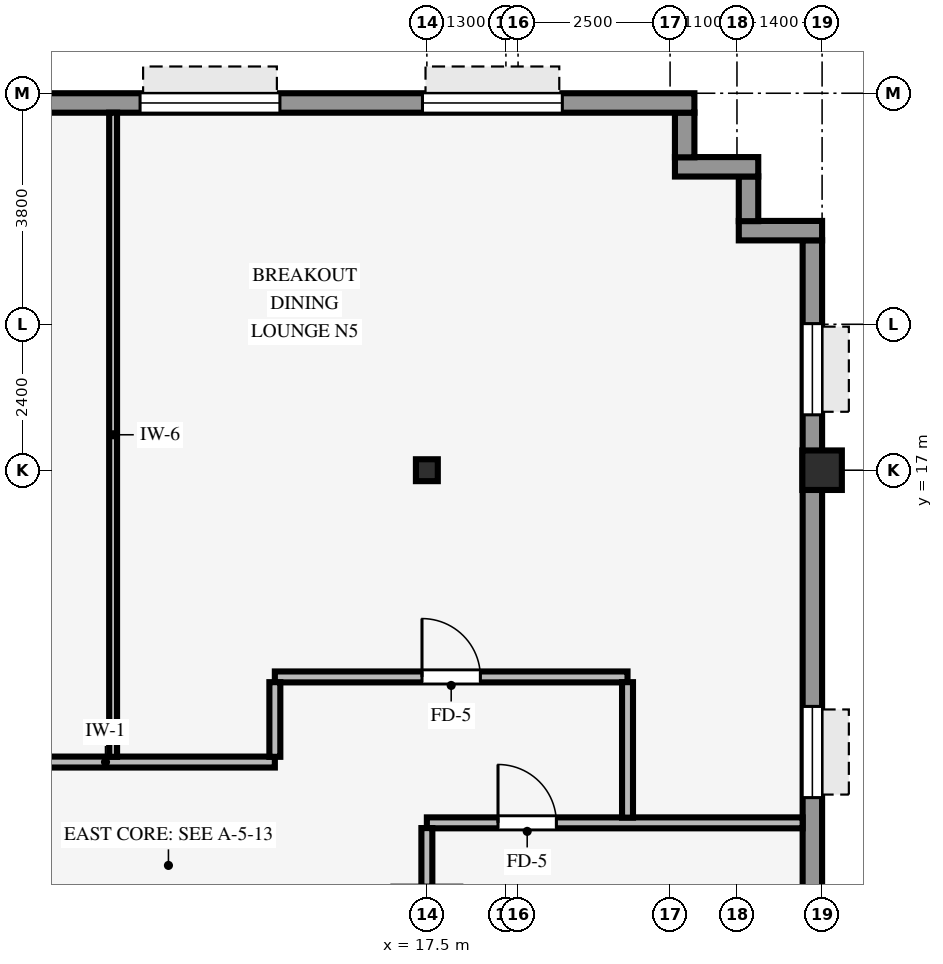
"""IFC4 building model, lengths in metres.
Left out: names, types, materials, properties, quantities, classifications, styles, units other than length and angle.
Written with IfcOpenShell. Run it as: python <this file> out.ifc"""

import sys

from ifc_helpers import new_model, si_unit, direction, frame, frame_2d, origin, origin_2d, place, context, subcontext, project, spatial, rectangle, hollow_rectangle, i_section, extrude, source, transform, mapped, element, fill, save


model = new_model("IFC4")
c1 = context("Model", 3, precision=1e-05, world=origin(), true_north=direction((0.0, 1.0)))
c2 = subcontext(c1, "Body", "Model", "MODEL_VIEW")
j1 = project(units=[si_unit("LENGTHUNIT", "METRE"), si_unit("PLANEANGLEUNIT", "RADIAN")], contexts=[c1])
p1 = place(None, origin())
s1 = spatial("IfcSite", under=j1, at=p1, CompositionType="ELEMENT")
p2 = place(p1, origin())
s2 = spatial("IfcBuilding", under=s1, at=p2, CompositionType="ELEMENT")
p3 = place(p2, frame((0.0, 0.0, 105.6)))
s3 = spatial("IfcBuildingStorey", under=s2, at=p3, CompositionType="ELEMENT", Elevation=105.6)
p4 = place(p3, frame((24.0, 17.0, 0.0), z_axis=(0.0, 0.0, 1.0), x_axis=(1.0, 0.0, 0.0)))
e1 = element("IfcColumn", 1, at=p4, inside=s3, PredefinedType="COLUMN", context=c2, shape_type="SweptSolid", body=[
    extrude(hollow_rectangle(XDim=0.65, YDim=0.65, WallThickness=0.04, InnerFilletRadius=0.04, OuterFilletRadius=0.08, at=origin_2d()), origin(), (0.0, 0.0, 1.0), 3.37),
])
p5 = place(p3, frame((17.5, 17.0, 0.0), z_axis=(0.0, 0.0, 1.0), x_axis=(1.0, 0.0, 0.0)))
e2 = element("IfcColumn", 2, at=p5, inside=s3, PredefinedType="COLUMN", context=c2, shape_type="SweptSolid", body=[
    extrude(i_section(OverallWidth=0.36, OverallDepth=0.36, WebThickness=0.021, FlangeThickness=0.021, FilletRadius=0.018, at=origin_2d()), origin(), (0.0, 0.0, 1.0), 3.37),
])
p6 = place(p3, frame((23.84, -20.784, 0.0), z_axis=(0.0, 0.0, 1.0), x_axis=(0.0, 1.0, 0.0)))
e3 = element("IfcWall", 3, at=p6, inside=s3, PredefinedType="STANDARD", context=c2, shape_type="SweptSolid", body=[
    extrude(rectangle(XDim=41.568, YDim=0.32, at=frame_2d((20.784, 0.0))), origin(), (0.0, 0.0, 1.0), 2.705),
])
p7 = place(p6, frame((1.373, 0.0, 0.8)))
e4 = element("IfcOpeningElement", 4, at=p7, cuts=e3, PredefinedType="OPENING", context=c2, shape_type="SweptSolid", body=[
    extrude(rectangle(XDim=1.5, YDim=1.6, at=frame_2d((0.75, 0.8))), frame((0.0, 0.17, 0.0), z_axis=(0.0, -1.0, 0.0), x_axis=(1.0, 0.0, 0.0)), (0.0, 0.0, 1.0), 0.34),
])
p8 = place(p6, frame((7.669, 0.0, 0.8)))
e5 = element("IfcOpeningElement", 5, at=p8, cuts=e3, PredefinedType="OPENING", context=c2, shape_type="SweptSolid", body=[
    extrude(rectangle(XDim=1.5, YDim=1.6, at=frame_2d((0.75, 0.8))), frame((0.0, 0.17, 0.0), z_axis=(0.0, -1.0, 0.0), x_axis=(1.0, 0.0, 0.0)), (0.0, 0.0, 1.0), 0.34),
])
p9 = place(p6, frame((12.615, 0.0, 0.8)))
e6 = element("IfcOpeningElement", 6, at=p9, cuts=e3, PredefinedType="OPENING", context=c2, shape_type="SweptSolid", body=[
    extrude(rectangle(XDim=1.5, YDim=1.6, at=frame_2d((0.75, 0.8))), frame((0.0, 0.17, 0.0), z_axis=(0.0, -1.0, 0.0), x_axis=(1.0, 0.0, 0.0)), (0.0, 0.0, 1.0), 0.34),
])
p10 = place(p6, frame((17.561, 0.0, 0.8)))
e7 = element("IfcOpeningElement", 7, at=p10, cuts=e3, PredefinedType="OPENING", context=c2, shape_type="SweptSolid", body=[
    extrude(rectangle(XDim=1.5, YDim=1.6, at=frame_2d((0.75, 0.8))), frame((0.0, 0.17, 0.0), z_axis=(0.0, -1.0, 0.0), x_axis=(1.0, 0.0, 0.0)), (0.0, 0.0, 1.0), 0.34),
])
p11 = place(p6, frame((22.507, 0.0, 0.8)))
e8 = element("IfcOpeningElement", 8, at=p11, cuts=e3, PredefinedType="OPENING", context=c2, shape_type="SweptSolid", body=[
    extrude(rectangle(XDim=1.5, YDim=1.6, at=frame_2d((0.75, 0.8))), frame((0.0, 0.17, 0.0), z_axis=(0.0, -1.0, 0.0), x_axis=(1.0, 0.0, 0.0)), (0.0, 0.0, 1.0), 0.34),
])
p12 = place(p6, frame((27.453, 0.0, 0.8)))
e9 = element("IfcOpeningElement", 9, at=p12, cuts=e3, PredefinedType="OPENING", context=c2, shape_type="SweptSolid", body=[
    extrude(rectangle(XDim=1.5, YDim=1.6, at=frame_2d((0.75, 0.8))), frame((0.0, 0.17, 0.0), z_axis=(0.0, -1.0, 0.0), x_axis=(1.0, 0.0, 0.0)), (0.0, 0.0, 1.0), 0.34),
])
p13 = place(p6, frame((32.399, 0.0, 0.8)))
e10 = element("IfcOpeningElement", 10, at=p13, cuts=e3, PredefinedType="OPENING", context=c2, shape_type="SweptSolid", body=[
    extrude(rectangle(XDim=1.5, YDim=1.6, at=frame_2d((0.75, 0.8))), frame((0.0, 0.17, 0.0), z_axis=(0.0, -1.0, 0.0), x_axis=(1.0, 0.0, 0.0)), (0.0, 0.0, 1.0), 0.34),
])
p14 = place(p6, frame((38.695, 0.0, 0.8)))
e11 = element("IfcOpeningElement", 11, at=p14, cuts=e3, PredefinedType="OPENING", context=c2, shape_type="SweptSolid", body=[
    extrude(rectangle(XDim=1.5, YDim=1.6, at=frame_2d((0.75, 0.8))), frame((0.0, 0.17, 0.0), z_axis=(0.0, -1.0, 0.0), x_axis=(1.0, 0.0, 0.0)), (0.0, 0.0, 1.0), 0.34),
])
p15 = place(p3, frame((22.63, 20.94, 0.0), z_axis=(0.0, 0.0, 1.0), x_axis=(1.0, 0.0, 0.0)))
e12 = element("IfcWall", 12, at=p15, inside=s3, PredefinedType="STANDARD", context=c2, shape_type="SweptSolid", body=[
    extrude(rectangle(XDim=1.37, YDim=0.32, at=frame_2d((0.685, 0.0))), origin(), (0.0, 0.0, 1.0), 3.36),
])
p16 = place(p3, frame((22.79, 21.096, 0.0), z_axis=(0.0, 0.0, 1.0), x_axis=(0.0, 1.0, 0.0)))
e13 = element("IfcWall", 13, at=p16, inside=s3, PredefinedType="STANDARD", context=c2, shape_type="SweptSolid", body=[
    extrude(rectangle(XDim=0.738, YDim=0.32, at=frame_2d((0.369, 0.0))), origin(), (0.0, 0.0, 1.0), 3.36),
])
p17 = place(p3, frame((21.58, 21.99, 0.0), z_axis=(0.0, 0.0, 1.0), x_axis=(1.0, 0.0, 0.0)))
e14 = element("IfcWall", 14, at=p17, inside=s3, PredefinedType="STANDARD", context=c2, shape_type="SweptSolid", body=[
    extrude(rectangle(XDim=1.37, YDim=0.32, at=frame_2d((0.685, 0.0))), origin(), (0.0, 0.0, 1.0), 3.36),
])
p18 = place(p3, frame((21.74, 22.146, 0.0), z_axis=(0.0, 0.0, 1.0), x_axis=(0.0, 1.0, 0.0)))
e15 = element("IfcWall", 15, at=p18, inside=s3, PredefinedType="STANDARD", context=c2, shape_type="SweptSolid", body=[
    extrude(rectangle(XDim=0.738, YDim=0.32, at=frame_2d((0.369, 0.0))), origin(), (0.0, 0.0, 1.0), 3.36),
])
p19 = place(p3, frame((-21.9, 23.04, 0.0), z_axis=(0.0, 0.0, 1.0), x_axis=(1.0, 0.0, 0.0)))
e16 = element("IfcWall", 16, at=p19, inside=s3, PredefinedType="STANDARD", context=c2, shape_type="SweptSolid", body=[
    extrude(rectangle(XDim=43.8, YDim=0.32, at=frame_2d((21.9, 0.0))), origin(), (0.0, 0.0, 1.0), 2.705),
])
p20 = place(p19, frame((26.85, 0.0, 0.0)))
e17 = element("IfcOpeningElement", 17, at=p20, cuts=e16, PredefinedType="OPENING", context=c2, shape_type="SweptSolid", body=[
    extrude(rectangle(XDim=1.05, YDim=2.1, at=frame_2d((0.525, 1.05))), frame((0.0, 0.17, 0.0), z_axis=(0.0, -1.0, 0.0), x_axis=(1.0, 0.0, 0.0)), (0.0, 0.0, 1.0), 0.34),
])
p21 = place(p19, frame((2.172, 0.0, 0.8)))
e18 = element("IfcOpeningElement", 18, at=p21, cuts=e16, PredefinedType="OPENING", context=c2, shape_type="SweptSolid", body=[
    extrude(rectangle(XDim=2.3, YDim=1.62, at=frame_2d((1.15, 0.81))), frame((0.0, 0.17, 0.0), z_axis=(0.0, -1.0, 0.0), x_axis=(1.0, 0.0, 0.0)), (0.0, 0.0, 1.0), 0.34),
])
p22 = place(p19, frame((5.917, 0.0, 0.8)))
e19 = element("IfcOpeningElement", 19, at=p22, cuts=e16, PredefinedType="OPENING", context=c2, shape_type="SweptSolid", body=[
    extrude(rectangle(XDim=2.3, YDim=1.62, at=frame_2d((1.15, 0.81))), frame((0.0, 0.17, 0.0), z_axis=(0.0, -1.0, 0.0), x_axis=(1.0, 0.0, 0.0)), (0.0, 0.0, 1.0), 0.34),
])
p23 = place(p19, frame((16.106, 0.0, 0.8)))
e20 = element("IfcOpeningElement", 20, at=p23, cuts=e16, PredefinedType="OPENING", context=c2, shape_type="SweptSolid", body=[
    extrude(rectangle(XDim=2.3, YDim=1.62, at=frame_2d((1.15, 0.81))), frame((0.0, 0.17, 0.0), z_axis=(0.0, -1.0, 0.0), x_axis=(1.0, 0.0, 0.0)), (0.0, 0.0, 1.0), 0.34),
])
p24 = place(p19, frame((34.683, 0.0, 0.8)))
e21 = element("IfcOpeningElement", 21, at=p24, cuts=e16, PredefinedType="OPENING", context=c2, shape_type="SweptSolid", body=[
    extrude(rectangle(XDim=2.3, YDim=1.62, at=frame_2d((1.15, 0.81))), frame((0.0, 0.17, 0.0), z_axis=(0.0, -1.0, 0.0), x_axis=(1.0, 0.0, 0.0)), (0.0, 0.0, 1.0), 0.34),
])
p25 = place(p19, frame((39.328, 0.0, 0.8)))
e22 = element("IfcOpeningElement", 22, at=p25, cuts=e16, PredefinedType="OPENING", context=c2, shape_type="SweptSolid", body=[
    extrude(rectangle(XDim=2.3, YDim=1.62, at=frame_2d((1.15, 0.81))), frame((0.0, 0.17, 0.0), z_axis=(0.0, -1.0, 0.0), x_axis=(1.0, 0.0, 0.0)), (0.0, 0.0, 1.0), 0.34),
])
p26 = place(p3, frame((17.5, 11.2, 0.0), z_axis=(0.0, 0.0, 1.0), x_axis=(1.0, 0.0, 0.0)))
e23 = element("IfcWall", 23, at=p26, inside=s3, PredefinedType="PARTITIONING", context=c2, shape_type="SweptSolid", body=[
    extrude(rectangle(XDim=6.18, YDim=0.18, at=frame_2d((3.09, 0.0))), origin(), (0.0, 0.0, 1.0), 3.36),
])
p27 = place(p26, frame((1.17, 0.0, 0.0)))
e24 = element("IfcOpeningElement", 24, at=p27, cuts=e23, PredefinedType="OPENING", context=c2, shape_type="SweptSolid", body=[
    extrude(rectangle(XDim=0.96, YDim=2.1, at=frame_2d((0.48, 1.05))), frame((0.0, 0.1, 0.0), z_axis=(0.0, -1.0, 0.0), x_axis=(1.0, 0.0, 0.0)), (0.0, 0.0, 1.0), 0.2),
])
p28 = place(p3, frame((-15.0, 12.2, 0.0), z_axis=(0.0, 0.0, 1.0), x_axis=(1.0, 0.0, 0.0)))
e25 = element("IfcWall", 25, at=p28, inside=s3, PredefinedType="PARTITIONING", context=c2, shape_type="SweptSolid", body=[
    extrude(rectangle(XDim=30.0, YDim=0.18, at=frame_2d((15.0, 0.0))), origin(), (0.0, 0.0, 1.0), 3.36),
])
p29 = place(p28, frame((23.02, 0.0, 0.0)))
e26 = element("IfcOpeningElement", 26, at=p29, cuts=e25, PredefinedType="OPENING", context=c2, shape_type="SweptSolid", body=[
    extrude(rectangle(XDim=0.96, YDim=2.1, at=frame_2d((0.48, 1.05))), frame((0.0, 0.1, 0.0), z_axis=(0.0, -1.0, 0.0), x_axis=(1.0, 0.0, 0.0)), (0.0, 0.0, 1.0), 0.2),
])
p30 = place(p28, frame((16.45, 0.0, 0.0)))
e27 = element("IfcOpeningElement", 27, at=p30, cuts=e25, PredefinedType="OPENING", context=c2, shape_type="SweptSolid", body=[
    extrude(rectangle(XDim=0.96, YDim=2.1, at=frame_2d((0.48, 1.05))), frame((0.0, 0.1, 0.0), z_axis=(0.0, -1.0, 0.0), x_axis=(1.0, 0.0, 0.0)), (0.0, 0.0, 1.0), 0.2),
])
p31 = place(p28, frame((5.45, 0.0, 0.0)))
e28 = element("IfcOpeningElement", 28, at=p31, cuts=e25, PredefinedType="OPENING", context=c2, shape_type="SweptSolid", body=[
    extrude(rectangle(XDim=0.9, YDim=2.1, at=frame_2d((0.45, 1.05))), frame((0.0, 0.1, 0.0), z_axis=(0.0, -1.0, 0.0), x_axis=(1.0, 0.0, 0.0)), (0.0, 0.0, 1.0), 0.2),
])
p32 = place(p28, frame((2.85, 0.0, 0.0)))
e29 = element("IfcOpeningElement", 29, at=p32, cuts=e25, PredefinedType="OPENING", context=c2, shape_type="SweptSolid", body=[
    extrude(rectangle(XDim=0.9, YDim=2.1, at=frame_2d((0.45, 1.05))), frame((0.0, 0.1, 0.0), z_axis=(0.0, -1.0, 0.0), x_axis=(1.0, 0.0, 0.0)), (0.0, 0.0, 1.0), 0.2),
])
p33 = place(p28, frame((12.52, 0.0, 0.0)))
e30 = element("IfcOpeningElement", 30, at=p33, cuts=e25, PredefinedType="OPENING", context=c2, shape_type="SweptSolid", body=[
    extrude(rectangle(XDim=0.96, YDim=2.1, at=frame_2d((0.48, 1.05))), frame((0.0, 0.1, 0.0), z_axis=(0.0, -1.0, 0.0), x_axis=(1.0, 0.0, 0.0)), (0.0, 0.0, 1.0), 0.2),
])
p34 = place(p28, frame((7.95, 0.0, 0.0)))
e31 = element("IfcOpeningElement", 31, at=p34, cuts=e25, PredefinedType="OPENING", context=c2, shape_type="SweptSolid", body=[
    extrude(rectangle(XDim=0.9, YDim=2.1, at=frame_2d((0.45, 1.05))), frame((0.0, 0.1, 0.0), z_axis=(0.0, -1.0, 0.0), x_axis=(1.0, 0.0, 0.0)), (0.0, 0.0, 1.0), 0.2),
])
p35 = place(p3, frame((15.0, 13.6, 0.0), z_axis=(0.0, 0.0, 1.0), x_axis=(1.0, 0.0, 0.0)))
e32 = element("IfcWall", 32, at=p35, inside=s3, PredefinedType="PARTITIONING", context=c2, shape_type="SweptSolid", body=[
    extrude(rectangle(XDim=5.8, YDim=0.18, at=frame_2d((2.9, 0.0))), origin(), (0.0, 0.0, 1.0), 2.998),
])
p36 = place(p35, frame((2.42, 0.0, 0.0)))
e33 = element("IfcOpeningElement", 33, at=p36, cuts=e32, PredefinedType="OPENING", context=c2, shape_type="SweptSolid", body=[
    extrude(rectangle(XDim=0.96, YDim=2.1, at=frame_2d((0.48, 1.05))), frame((0.0, 0.1, 0.0), z_axis=(0.0, -1.0, 0.0), x_axis=(1.0, 0.0, 0.0)), (0.0, 0.0, 1.0), 0.2),
])
p37 = place(p3, frame((12.34, 12.286, 0.0), z_axis=(0.0, 0.0, 1.0), x_axis=(0.0, 1.0, 0.0)))
e34 = element("IfcWall", 34, at=p37, inside=s3, PredefinedType="PARTITIONING", context=c2, shape_type="SweptSolid", body=[
    extrude(rectangle(XDim=10.594, YDim=0.13, at=frame_2d((5.297, 0.0))), origin(), (0.0, 0.0, 1.0), 3.36),
])
p38 = place(p3, frame((15.0, 12.286, 0.0), z_axis=(0.0, 0.0, 1.0), x_axis=(0.0, 1.0, 0.0)))
e35 = element("IfcWall", 35, at=p38, inside=s3, PredefinedType="PARTITIONING", context=c2, shape_type="SweptSolid", body=[
    extrude(rectangle(XDim=1.228, YDim=0.18, at=frame_2d((0.614, 0.0))), origin(), (0.0, 0.0, 1.0), 3.36),
])
p39 = place(p3, frame((17.5, 10.146, 0.0), z_axis=(0.0, 0.0, 1.0), x_axis=(0.0, 1.0, 0.0)))
e36 = element("IfcWall", 36, at=p39, inside=s3, PredefinedType="PARTITIONING", context=c2, shape_type="SweptSolid", body=[
    extrude(rectangle(XDim=0.968, YDim=0.18, at=frame_2d((0.484, 0.0))), origin(), (0.0, 0.0, 1.0), 2.738),
])
p40 = place(p3, frame((20.8, 11.286, 0.0), z_axis=(0.0, 0.0, 1.0), x_axis=(0.0, 1.0, 0.0)))
e37 = element("IfcWall", 37, at=p40, inside=s3, PredefinedType="PARTITIONING", context=c2, shape_type="SweptSolid", body=[
    extrude(rectangle(XDim=2.228, YDim=0.18, at=frame_2d((1.114, 0.0))), origin(), (0.0, 0.0, 1.0), 3.36),
])
m1 = source(origin(), c2, "Body", "SweptSolid", [
    extrude(rectangle(XDim=1.5, YDim=1.6, at=frame_2d((0.75, 0.8))), frame((0.0, 0.03, 0.0), z_axis=(0.0, -1.0, 0.0), x_axis=(1.0, 0.0, 0.0)), (0.0, 0.0, 1.0), 0.06),
])
p41 = place(p13, origin())
e38 = element("IfcWindow", 38, at=p41, inside=s3, PartitioningType="SINGLE_PANEL", PredefinedType="WINDOW", context=c2, shape_type="MappedRepresentation", body=[
    mapped(m1, transform((0.0, 0.0, 0.0), scale=1.0)),
])
fill(e10, e38)
p42 = place(p14, origin())
e39 = element("IfcWindow", 39, at=p42, inside=s3, PartitioningType="SINGLE_PANEL", PredefinedType="WINDOW", context=c2, shape_type="MappedRepresentation", body=[
    mapped(m1, transform((0.0, 0.0, 0.0), scale=1.0)),
])
fill(e11, e39)
m2 = source(origin(), c2, "Body", "SweptSolid", [
    extrude(rectangle(XDim=2.3, YDim=1.62, at=frame_2d((1.15, 0.81))), frame((0.0, 0.03, 0.0), z_axis=(0.0, -1.0, 0.0), x_axis=(1.0, 0.0, 0.0)), (0.0, 0.0, 1.0), 0.06),
])
p43 = place(p24, origin())
e40 = element("IfcWindow", 40, at=p43, inside=s3, PartitioningType="SINGLE_PANEL", PredefinedType="WINDOW", context=c2, shape_type="MappedRepresentation", body=[
    mapped(m2, transform((0.0, 0.0, 0.0), scale=1.0)),
])
fill(e21, e40)
p44 = place(p25, origin())
e41 = element("IfcWindow", 41, at=p44, inside=s3, PartitioningType="SINGLE_PANEL", PredefinedType="WINDOW", context=c2, shape_type="MappedRepresentation", body=[
    mapped(m2, transform((0.0, 0.0, 0.0), scale=1.0)),
])
fill(e22, e41)
m3 = source(origin(), c2, "Body", "SweptSolid", [
    extrude(rectangle(XDim=0.96, YDim=2.1, at=frame_2d((0.48, 1.05))), frame((0.0, 0.025, 0.0), z_axis=(0.0, -1.0, 0.0), x_axis=(1.0, 0.0, 0.0)), (0.0, 0.0, 1.0), 0.05),
])
p45 = place(p36, origin())
e42 = element("IfcDoor", 42, at=p45, inside=s3, OperationType="SINGLE_SWING_LEFT", PredefinedType="DOOR", context=c2, shape_type="MappedRepresentation", body=[
    mapped(m3, transform((0.0, 0.0, 0.0), scale=1.0)),
])
fill(e33, e42)
p46 = place(p27, origin())
e43 = element("IfcDoor", 43, at=p46, inside=s3, OperationType="SINGLE_SWING_LEFT", PredefinedType="DOOR", context=c2, shape_type="MappedRepresentation", body=[
    mapped(m3, transform((0.0, 0.0, 0.0), scale=1.0)),
])
fill(e24, e43)
save(model, sys.argv[1])
